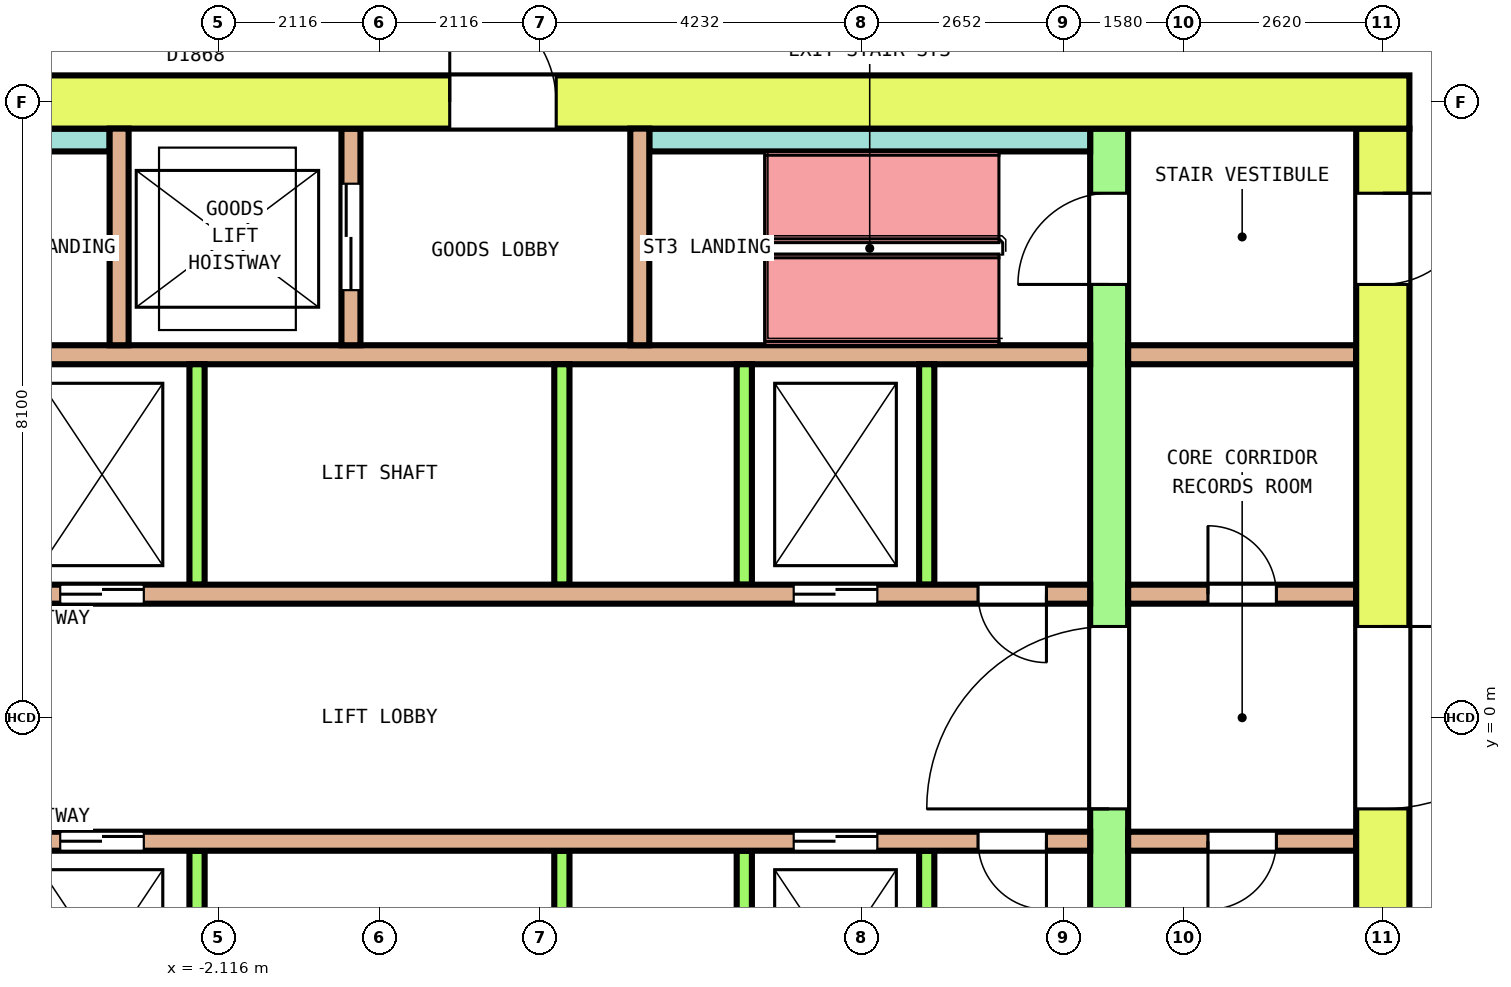
"""IFC4 building model, lengths in metres.
Left out: names, types, materials, properties, quantities, classifications, styles, units other than length and angle.
Written with IfcOpenShell. Run it as: python <this file> out.ifc"""

import sys

from ifc_helpers import new_model, si_unit, direction, frame, frame_2d, origin, place, context, subcontext, project, spatial, rectangle, extrude, element, fill, save


model = new_model("IFC4")
c1 = context("Model", 3, precision=1e-05, world=origin(), true_north=direction((0.0, 1.0)))
c2 = subcontext(c1, "Body", "Model", "MODEL_VIEW")
j1 = project(units=[si_unit("LENGTHUNIT", "METRE"), si_unit("PLANEANGLEUNIT", "RADIAN")], contexts=[c1])
p1 = place(None, origin())
s1 = spatial("IfcSite", under=j1, at=p1, CompositionType="ELEMENT")
p2 = place(p1, origin())
s2 = spatial("IfcBuilding", under=s1, at=p2, CompositionType="ELEMENT")
p3 = place(p2, frame((0.0, 0.0, 184.8)))
s3 = spatial("IfcBuildingStorey", under=s2, at=p3, CompositionType="ELEMENT", Elevation=184.8)
p4 = place(p3, frame((-13.55, 8.1, 0.0), z_axis=(0.0, 0.0, 1.0), x_axis=(1.0, 0.0, 0.0)))
e1 = element("IfcWall", 1, at=p4, inside=s3, PredefinedType="SHEAR", context=c2, shape_type="SweptSolid", body=[
    extrude(rectangle(XDim=27.1, YDim=0.7, at=frame_2d((13.55, 0.0))), origin(), (0.0, 0.0, 1.0), 4.1),
])
p5 = place(p4, frame((14.475, 0.0, 0.0)))
e2 = element("IfcOpeningElement", 2, at=p5, cuts=e1, PredefinedType="OPENING", context=c2, shape_type="SweptSolid", body=[
    extrude(rectangle(XDim=1.4, YDim=2.1, at=frame_2d((0.7, 1.05))), frame((0.0, 0.36, 0.0), z_axis=(0.0, -1.0, 0.0), x_axis=(1.0, 0.0, 0.0)), (0.0, 0.0, 1.0), 0.72),
])
p6 = place(p3, frame((13.2, -7.75, 0.0), z_axis=(0.0, 0.0, 1.0), x_axis=(0.0, 1.0, 0.0)))
e3 = element("IfcWall", 3, at=p6, inside=s3, PredefinedType="SHEAR", context=c2, shape_type="SweptSolid", body=[
    extrude(rectangle(XDim=15.5, YDim=0.7, at=frame_2d((7.75, 0.0))), origin(), (0.0, 0.0, 1.0), 4.1),
])
p7 = place(p6, frame((6.55, 0.0, 0.0)))
e4 = element("IfcOpeningElement", 4, at=p7, cuts=e3, PredefinedType="OPENING", context=c2, shape_type="SweptSolid", body=[
    extrude(rectangle(XDim=2.4, YDim=2.1, at=frame_2d((1.2, 1.05))), frame((0.0, 0.36, 0.0), z_axis=(0.0, -1.0, 0.0), x_axis=(1.0, 0.0, 0.0)), (0.0, 0.0, 1.0), 0.72),
])
p8 = place(p6, frame((13.45, 0.0, 0.0)))
e5 = element("IfcOpeningElement", 5, at=p8, cuts=e3, PredefinedType="OPENING", context=c2, shape_type="SweptSolid", body=[
    extrude(rectangle(XDim=1.2, YDim=2.1, at=frame_2d((0.6, 1.05))), frame((0.0, 0.36, 0.0), z_axis=(0.0, -1.0, 0.0), x_axis=(1.0, 0.0, 0.0)), (0.0, 0.0, 1.0), 0.72),
])
p9 = place(p6, frame((0.181, 0.0, 0.0)))
e6 = element("IfcOpeningElement", 6, at=p9, cuts=e3, PredefinedType="OPENING", context=c2, shape_type="SweptSolid", body=[
    extrude(rectangle(XDim=1.0, YDim=2.1, at=frame_2d((0.5, 1.05))), frame((0.0, 0.36, 0.0), z_axis=(0.0, -1.0, 0.0), x_axis=(1.0, 0.0, 0.0)), (0.0, 0.0, 1.0), 0.72),
])
p10 = place(p6, frame((1.669, 0.0, 0.0)))
e7 = element("IfcOpeningElement", 7, at=p10, cuts=e3, PredefinedType="OPENING", context=c2, shape_type="SweptSolid", body=[
    extrude(rectangle(XDim=1.0, YDim=2.1, at=frame_2d((0.5, 1.05))), frame((0.0, 0.36, 0.0), z_axis=(0.0, -1.0, 0.0), x_axis=(1.0, 0.0, 0.0)), (0.0, 0.0, 1.0), 0.72),
])
p11 = place(p3, frame((9.6, -7.75, 0.0), z_axis=(0.0, 0.0, 1.0), x_axis=(0.0, 1.0, 0.0)))
e8 = element("IfcWall", 8, at=p11, inside=s3, PredefinedType="SHEAR", context=c2, shape_type="SweptSolid", body=[
    extrude(rectangle(XDim=15.5, YDim=0.5, at=frame_2d((7.75, 0.0))), origin(), (0.0, 0.0, 1.0), 4.1),
])
p12 = place(p11, frame((6.55, 0.0, 0.0)))
e9 = element("IfcOpeningElement", 9, at=p12, cuts=e8, PredefinedType="OPENING", context=c2, shape_type="SweptSolid", body=[
    extrude(rectangle(XDim=2.4, YDim=2.1, at=frame_2d((1.2, 1.05))), frame((0.0, 0.26, 0.0), z_axis=(0.0, -1.0, 0.0), x_axis=(1.0, 0.0, 0.0)), (0.0, 0.0, 1.0), 0.52),
])
p13 = place(p11, frame((13.45, 0.0, 0.0)))
e10 = element("IfcOpeningElement", 10, at=p13, cuts=e8, PredefinedType="OPENING", context=c2, shape_type="SweptSolid", body=[
    extrude(rectangle(XDim=1.2, YDim=2.1, at=frame_2d((0.6, 1.05))), frame((0.0, 0.26, 0.0), z_axis=(0.0, -1.0, 0.0), x_axis=(1.0, 0.0, 0.0)), (0.0, 0.0, 1.0), 0.52),
])
p14 = place(p11, frame((0.95, 0.0, 0.0)))
e11 = element("IfcOpeningElement", 11, at=p14, cuts=e8, PredefinedType="OPENING", context=c2, shape_type="SweptSolid", body=[
    extrude(rectangle(XDim=1.0, YDim=2.1, at=frame_2d((0.5, 1.05))), frame((0.0, 0.26, 0.0), z_axis=(0.0, -1.0, 0.0), x_axis=(1.0, 0.0, 0.0)), (0.0, 0.0, 1.0), 0.52),
])
p15 = place(p3, frame((-9.35, 1.625, 0.0), z_axis=(0.0, 0.0, 1.0), x_axis=(1.0, 0.0, 0.0)))
e12 = element("IfcWall", 12, at=p15, inside=s3, PredefinedType="SOLIDWALL", context=c2, shape_type="SweptSolid", body=[
    extrude(rectangle(XDim=18.7, YDim=0.25, at=frame_2d((9.35, 0.0))), origin(), (0.0, 0.0, 1.0), 4.1),
])
p16 = place(p15, frame((2.85, 0.0, 0.0)))
e13 = element("IfcOpeningElement", 13, at=p16, cuts=e12, PredefinedType="OPENING", context=c2, shape_type="SweptSolid", body=[
    extrude(rectangle(XDim=1.1, YDim=2.1, at=frame_2d((0.55, 1.05))), frame((0.0, 0.135, 0.0), z_axis=(0.0, -1.0, 0.0), x_axis=(1.0, 0.0, 0.0)), (0.0, 0.0, 1.0), 0.27),
])
p17 = place(p15, frame((5.15, 0.0, 0.0)))
e14 = element("IfcOpeningElement", 14, at=p17, cuts=e12, PredefinedType="OPENING", context=c2, shape_type="SweptSolid", body=[
    extrude(rectangle(XDim=1.1, YDim=2.1, at=frame_2d((0.55, 1.05))), frame((0.0, 0.135, 0.0), z_axis=(0.0, -1.0, 0.0), x_axis=(1.0, 0.0, 0.0)), (0.0, 0.0, 1.0), 0.27),
])
p18 = place(p15, frame((14.8, 0.0, 0.0)))
e15 = element("IfcOpeningElement", 15, at=p18, cuts=e12, PredefinedType="OPENING", context=c2, shape_type="SweptSolid", body=[
    extrude(rectangle(XDim=1.1, YDim=2.1, at=frame_2d((0.55, 1.05))), frame((0.0, 0.135, 0.0), z_axis=(0.0, -1.0, 0.0), x_axis=(1.0, 0.0, 0.0)), (0.0, 0.0, 1.0), 0.27),
])
p19 = place(p15, frame((0.575, 0.0, 0.0)))
e16 = element("IfcOpeningElement", 16, at=p19, cuts=e12, PredefinedType="OPENING", context=c2, shape_type="SweptSolid", body=[
    extrude(rectangle(XDim=0.9, YDim=2.1, at=frame_2d((0.45, 1.05))), frame((0.0, 0.135, 0.0), z_axis=(0.0, -1.0, 0.0), x_axis=(1.0, 0.0, 0.0)), (0.0, 0.0, 1.0), 0.27),
])
p20 = place(p15, frame((17.225, 0.0, 0.0)))
e17 = element("IfcOpeningElement", 17, at=p20, cuts=e12, PredefinedType="OPENING", context=c2, shape_type="SweptSolid", body=[
    extrude(rectangle(XDim=0.9, YDim=2.1, at=frame_2d((0.45, 1.05))), frame((0.0, 0.135, 0.0), z_axis=(0.0, -1.0, 0.0), x_axis=(1.0, 0.0, 0.0)), (0.0, 0.0, 1.0), 0.27),
])
p21 = place(p3, frame((9.85, 1.625, 0.0), z_axis=(0.0, 0.0, 1.0), x_axis=(1.0, 0.0, 0.0)))
e18 = element("IfcWall", 18, at=p21, inside=s3, PredefinedType="SOLIDWALL", context=c2, shape_type="SweptSolid", body=[
    extrude(rectangle(XDim=3.0, YDim=0.25, at=frame_2d((1.5, 0.0))), origin(), (0.0, 0.0, 1.0), 4.1),
])
p22 = place(p21, frame((1.05, 0.0, 0.0)))
e19 = element("IfcOpeningElement", 19, at=p22, cuts=e18, PredefinedType="OPENING", context=c2, shape_type="SweptSolid", body=[
    extrude(rectangle(XDim=0.9, YDim=2.1, at=frame_2d((0.45, 1.05))), frame((0.0, 0.135, 0.0), z_axis=(0.0, -1.0, 0.0), x_axis=(1.0, 0.0, 0.0)), (0.0, 0.0, 1.0), 0.27),
])
p23 = place(p3, frame((-9.35, 4.775, 0.0), z_axis=(0.0, 0.0, 1.0), x_axis=(1.0, 0.0, 0.0)))
e20 = element("IfcWall", 20, at=p23, inside=s3, PredefinedType="SOLIDWALL", context=c2, shape_type="SweptSolid", body=[
    extrude(rectangle(XDim=18.7, YDim=0.25, at=frame_2d((9.35, 0.0))), origin(), (0.0, 0.0, 1.0), 4.1),
])
p24 = place(p3, frame((9.85, 4.775, 0.0), z_axis=(0.0, 0.0, 1.0), x_axis=(1.0, 0.0, 0.0)))
e21 = element("IfcWall", 21, at=p24, inside=s3, PredefinedType="SOLIDWALL", context=c2, shape_type="SweptSolid", body=[
    extrude(rectangle(XDim=3.0, YDim=0.25, at=frame_2d((1.5, 0.0))), origin(), (0.0, 0.0, 1.0), 4.1),
])
for number, where, z_axis, x_axis in (
    (22, (-2.4, 1.75, 0.0), (0.0, 0.0, 1.0), (0.0, 1.0, 0.0)),
    (23, (2.4, 1.75, 0.0), (0.0, 0.0, 1.0), (0.0, 1.0, 0.0)),
    (24, (4.8, 1.75, 0.0), (0.0, 0.0, 1.0), (0.0, 1.0, 0.0)),
    (25, (7.2, 1.75, 0.0), (0.0, 0.0, 1.0), (0.0, 1.0, 0.0)),
):
    element("IfcWall", number, at=place(p3, frame(where, z_axis=z_axis, x_axis=x_axis)), inside=s3, PredefinedType="SOLIDWALL", context=c2, shape_type="SweptSolid", body=[
        extrude(rectangle(XDim=2.9, YDim=0.2, at=frame_2d((1.45, 0.0))), origin(), (0.0, 0.0, 1.0), 4.1),
    ])
p25 = place(p3, frame((-9.35, -1.625, 0.0), z_axis=(0.0, 0.0, 1.0), x_axis=(1.0, 0.0, 0.0)))
e26 = element("IfcWall", 26, at=p25, inside=s3, PredefinedType="SOLIDWALL", context=c2, shape_type="SweptSolid", body=[
    extrude(rectangle(XDim=18.7, YDim=0.25, at=frame_2d((9.35, 0.0))), origin(), (0.0, 0.0, 1.0), 4.1),
])
p26 = place(p25, frame((2.85, 0.0, 0.0)))
e27 = element("IfcOpeningElement", 27, at=p26, cuts=e26, PredefinedType="OPENING", context=c2, shape_type="SweptSolid", body=[
    extrude(rectangle(XDim=1.1, YDim=2.1, at=frame_2d((0.55, 1.05))), frame((0.0, 0.135, 0.0), z_axis=(0.0, -1.0, 0.0), x_axis=(1.0, 0.0, 0.0)), (0.0, 0.0, 1.0), 0.27),
])
p27 = place(p25, frame((5.15, 0.0, 0.0)))
e28 = element("IfcOpeningElement", 28, at=p27, cuts=e26, PredefinedType="OPENING", context=c2, shape_type="SweptSolid", body=[
    extrude(rectangle(XDim=1.1, YDim=2.1, at=frame_2d((0.55, 1.05))), frame((0.0, 0.135, 0.0), z_axis=(0.0, -1.0, 0.0), x_axis=(1.0, 0.0, 0.0)), (0.0, 0.0, 1.0), 0.27),
])
p28 = place(p25, frame((14.8, 0.0, 0.0)))
e29 = element("IfcOpeningElement", 29, at=p28, cuts=e26, PredefinedType="OPENING", context=c2, shape_type="SweptSolid", body=[
    extrude(rectangle(XDim=1.1, YDim=2.1, at=frame_2d((0.55, 1.05))), frame((0.0, 0.135, 0.0), z_axis=(0.0, -1.0, 0.0), x_axis=(1.0, 0.0, 0.0)), (0.0, 0.0, 1.0), 0.27),
])
p29 = place(p25, frame((0.575, 0.0, 0.0)))
e30 = element("IfcOpeningElement", 30, at=p29, cuts=e26, PredefinedType="OPENING", context=c2, shape_type="SweptSolid", body=[
    extrude(rectangle(XDim=0.9, YDim=2.1, at=frame_2d((0.45, 1.05))), frame((0.0, 0.135, 0.0), z_axis=(0.0, -1.0, 0.0), x_axis=(1.0, 0.0, 0.0)), (0.0, 0.0, 1.0), 0.27),
])
p30 = place(p25, frame((17.225, 0.0, 0.0)))
e31 = element("IfcOpeningElement", 31, at=p30, cuts=e26, PredefinedType="OPENING", context=c2, shape_type="SweptSolid", body=[
    extrude(rectangle(XDim=0.9, YDim=2.1, at=frame_2d((0.45, 1.05))), frame((0.0, 0.135, 0.0), z_axis=(0.0, -1.0, 0.0), x_axis=(1.0, 0.0, 0.0)), (0.0, 0.0, 1.0), 0.27),
])
p31 = place(p3, frame((9.85, -1.625, 0.0), z_axis=(0.0, 0.0, 1.0), x_axis=(1.0, 0.0, 0.0)))
e32 = element("IfcWall", 32, at=p31, inside=s3, PredefinedType="SOLIDWALL", context=c2, shape_type="SweptSolid", body=[
    extrude(rectangle(XDim=3.0, YDim=0.25, at=frame_2d((1.5, 0.0))), origin(), (0.0, 0.0, 1.0), 4.1),
])
p32 = place(p31, frame((1.05, 0.0, 0.0)))
e33 = element("IfcOpeningElement", 33, at=p32, cuts=e32, PredefinedType="OPENING", context=c2, shape_type="SweptSolid", body=[
    extrude(rectangle(XDim=0.9, YDim=2.1, at=frame_2d((0.45, 1.05))), frame((0.0, 0.135, 0.0), z_axis=(0.0, -1.0, 0.0), x_axis=(1.0, 0.0, 0.0)), (0.0, 0.0, 1.0), 0.27),
])
for number, where, z_axis, x_axis in (
    (34, (-2.4, -4.65, 0.0), (0.0, 0.0, 1.0), (0.0, 1.0, 0.0)),
    (35, (2.4, -4.65, 0.0), (0.0, 0.0, 1.0), (0.0, 1.0, 0.0)),
    (36, (4.8, -4.65, 0.0), (0.0, 0.0, 1.0), (0.0, 1.0, 0.0)),
    (37, (7.2, -4.65, 0.0), (0.0, 0.0, 1.0), (0.0, 1.0, 0.0)),
):
    element("IfcWall", number, at=place(p3, frame(where, z_axis=z_axis, x_axis=x_axis)), inside=s3, PredefinedType="SOLIDWALL", context=c2, shape_type="SweptSolid", body=[
        extrude(rectangle(XDim=2.9, YDim=0.2, at=frame_2d((1.45, 0.0))), origin(), (0.0, 0.0, 1.0), 4.1),
    ])
for number, where, z_axis, x_axis in (
    (38, (-9.35, 7.6, 0.0), (0.0, 0.0, 1.0), (1.0, 0.0, 0.0)),
    (39, (3.55, 7.6, 0.0), (0.0, 0.0, 1.0), (1.0, 0.0, 0.0)),
):
    element("IfcWall", number, at=place(p3, frame(where, z_axis=z_axis, x_axis=x_axis)), inside=s3, PredefinedType="SOLIDWALL", context=c2, shape_type="SweptSolid", body=[
        extrude(rectangle(XDim=5.8, YDim=0.3, at=frame_2d((2.9, 0.0))), origin(), (0.0, 0.0, 1.0), 4.1),
    ])
p33 = place(p3, frame((-3.425, 4.9, 0.0), z_axis=(0.0, 0.0, 1.0), x_axis=(0.0, 1.0, 0.0)))
e40 = element("IfcWall", 40, at=p33, inside=s3, PredefinedType="SOLIDWALL", context=c2, shape_type="SweptSolid", body=[
    extrude(rectangle(XDim=2.85, YDim=0.25, at=frame_2d((1.425, 0.0))), origin(), (0.0, 0.0, 1.0), 4.1),
])
p34 = place(p3, frame((-0.375, 4.9, 0.0), z_axis=(0.0, 0.0, 1.0), x_axis=(0.0, 1.0, 0.0)))
e41 = element("IfcWall", 41, at=p34, inside=s3, PredefinedType="SOLIDWALL", context=c2, shape_type="SweptSolid", body=[
    extrude(rectangle(XDim=2.85, YDim=0.25, at=frame_2d((1.425, 0.0))), origin(), (0.0, 0.0, 1.0), 4.1),
])
p35 = place(p34, frame((0.725, 0.0, 0.0)))
e42 = element("IfcOpeningElement", 42, at=p35, cuts=e41, PredefinedType="OPENING", context=c2, shape_type="SweptSolid", body=[
    extrude(rectangle(XDim=1.4, YDim=2.1, at=frame_2d((0.7, 1.05))), frame((0.0, 0.135, 0.0), z_axis=(0.0, -1.0, 0.0), x_axis=(1.0, 0.0, 0.0)), (0.0, 0.0, 1.0), 0.27),
])
p36 = place(p3, frame((3.425, 4.9, 0.0), z_axis=(0.0, 0.0, 1.0), x_axis=(0.0, 1.0, 0.0)))
e43 = element("IfcWall", 43, at=p36, inside=s3, PredefinedType="SOLIDWALL", context=c2, shape_type="SweptSolid", body=[
    extrude(rectangle(XDim=2.85, YDim=0.25, at=frame_2d((1.425, 0.0))), origin(), (0.0, 0.0, 1.0), 4.1),
])
p37 = place(p17, origin())
e44 = element("IfcDoor", 44, at=p37, inside=s3, OperationType="DOUBLE_DOOR_SLIDING", PredefinedType="DOOR", context=c2, shape_type="SweptSolid", body=[
    extrude(rectangle(XDim=1.1, YDim=2.1, at=frame_2d((0.55, 1.05))), frame((0.0, 0.075, 0.0), z_axis=(0.0, -1.0, 0.0), x_axis=(1.0, 0.0, 0.0)), (0.0, 0.0, 1.0), 0.15),
])
fill(e14, e44)
p38 = place(p18, origin())
e45 = element("IfcDoor", 45, at=p38, inside=s3, OperationType="DOUBLE_DOOR_SLIDING", PredefinedType="DOOR", context=c2, shape_type="SweptSolid", body=[
    extrude(rectangle(XDim=1.1, YDim=2.1, at=frame_2d((0.55, 1.05))), frame((0.0, 0.075, 0.0), z_axis=(0.0, -1.0, 0.0), x_axis=(1.0, 0.0, 0.0)), (0.0, 0.0, 1.0), 0.15),
])
fill(e15, e45)
p39 = place(p27, origin())
e46 = element("IfcDoor", 46, at=p39, inside=s3, OperationType="DOUBLE_DOOR_SLIDING", PredefinedType="DOOR", context=c2, shape_type="SweptSolid", body=[
    extrude(rectangle(XDim=1.1, YDim=2.1, at=frame_2d((0.55, 1.05))), frame((0.0, 0.075, 0.0), z_axis=(0.0, -1.0, 0.0), x_axis=(1.0, 0.0, 0.0)), (0.0, 0.0, 1.0), 0.15),
])
fill(e28, e46)
p40 = place(p28, origin())
e47 = element("IfcDoor", 47, at=p40, inside=s3, OperationType="DOUBLE_DOOR_SLIDING", PredefinedType="DOOR", context=c2, shape_type="SweptSolid", body=[
    extrude(rectangle(XDim=1.1, YDim=2.1, at=frame_2d((0.55, 1.05))), frame((0.0, 0.075, 0.0), z_axis=(0.0, -1.0, 0.0), x_axis=(1.0, 0.0, 0.0)), (0.0, 0.0, 1.0), 0.15),
])
fill(e29, e47)
p41 = place(p35, origin())
e48 = element("IfcDoor", 48, at=p41, inside=s3, OperationType="DOUBLE_DOOR_SLIDING", PredefinedType="DOOR", context=c2, shape_type="SweptSolid", body=[
    extrude(rectangle(XDim=1.4, YDim=2.1, at=frame_2d((0.7, 1.05))), frame((0.0, 0.075, 0.0), z_axis=(0.0, -1.0, 0.0), x_axis=(1.0, 0.0, 0.0)), (0.0, 0.0, 1.0), 0.15),
])
fill(e42, e48)
p42 = place(p12, origin())
e49 = element("IfcDoor", 49, at=p42, inside=s3, OperationType="DOUBLE_DOOR_SINGLE_SWING", PredefinedType="DOOR", context=c2, shape_type="SweptSolid", body=[
    extrude(rectangle(XDim=2.4, YDim=2.1, at=frame_2d((1.2, 1.05))), frame((0.0, 0.2, 0.0), z_axis=(0.0, -1.0, 0.0), x_axis=(1.0, 0.0, 0.0)), (0.0, 0.0, 1.0), 0.4),
])
fill(e9, e49)
p43 = place(p7, origin())
e50 = element("IfcDoor", 50, at=p43, inside=s3, OperationType="DOUBLE_DOOR_SINGLE_SWING", PredefinedType="DOOR", context=c2, shape_type="SweptSolid", body=[
    extrude(rectangle(XDim=2.4, YDim=2.1, at=frame_2d((1.2, 1.05))), frame((0.0, 0.3, 0.0), z_axis=(0.0, -1.0, 0.0), x_axis=(1.0, 0.0, 0.0)), (0.0, 0.0, 1.0), 0.6),
])
fill(e4, e50)
p44 = place(p13, origin())
e51 = element("IfcDoor", 51, at=p44, inside=s3, OperationType="SINGLE_SWING_LEFT", PredefinedType="DOOR", context=c2, shape_type="SweptSolid", body=[
    extrude(rectangle(XDim=1.2, YDim=2.1, at=frame_2d((0.6, 1.05))), frame((0.0, 0.2, 0.0), z_axis=(0.0, -1.0, 0.0), x_axis=(1.0, 0.0, 0.0)), (0.0, 0.0, 1.0), 0.4),
])
fill(e10, e51)
p45 = place(p8, origin())
e52 = element("IfcDoor", 52, at=p45, inside=s3, OperationType="SINGLE_SWING_RIGHT", PredefinedType="DOOR", context=c2, shape_type="SweptSolid", body=[
    extrude(rectangle(XDim=1.2, YDim=2.1, at=frame_2d((0.6, 1.05))), frame((0.0, 0.3, 0.0), z_axis=(0.0, -1.0, 0.0), x_axis=(1.0, 0.0, 0.0)), (0.0, 0.0, 1.0), 0.6),
])
fill(e5, e52)
p46 = place(p5, origin())
e53 = element("IfcDoor", 53, at=p46, inside=s3, OperationType="DOUBLE_DOOR_SINGLE_SWING", PredefinedType="DOOR", context=c2, shape_type="SweptSolid", body=[
    extrude(rectangle(XDim=1.4, YDim=2.1, at=frame_2d((0.7, 1.05))), frame((0.0, 0.3, 0.0), z_axis=(0.0, -1.0, 0.0), x_axis=(1.0, 0.0, 0.0)), (0.0, 0.0, 1.0), 0.6),
])
fill(e2, e53)
p47 = place(p20, origin())
e54 = element("IfcDoor", 54, at=p47, inside=s3, OperationType="SINGLE_SWING_LEFT", PredefinedType="DOOR", context=c2, shape_type="SweptSolid", body=[
    extrude(rectangle(XDim=0.9, YDim=2.1, at=frame_2d((0.45, 1.05))), frame((0.0, 0.075, 0.0), z_axis=(0.0, -1.0, 0.0), x_axis=(1.0, 0.0, 0.0)), (0.0, 0.0, 1.0), 0.15),
])
fill(e17, e54)
p48 = place(p22, origin())
e55 = element("IfcDoor", 55, at=p48, inside=s3, OperationType="SINGLE_SWING_RIGHT", PredefinedType="DOOR", context=c2, shape_type="SweptSolid", body=[
    extrude(rectangle(XDim=0.9, YDim=2.1, at=frame_2d((0.45, 1.05))), frame((0.0, 0.075, 0.0), z_axis=(0.0, -1.0, 0.0), x_axis=(1.0, 0.0, 0.0)), (0.0, 0.0, 1.0), 0.15),
])
fill(e19, e55)
p49 = place(p30, origin())
e56 = element("IfcDoor", 56, at=p49, inside=s3, OperationType="SINGLE_SWING_RIGHT", PredefinedType="DOOR", context=c2, shape_type="SweptSolid", body=[
    extrude(rectangle(XDim=0.9, YDim=2.1, at=frame_2d((0.45, 1.05))), frame((0.0, 0.075, 0.0), z_axis=(0.0, -1.0, 0.0), x_axis=(1.0, 0.0, 0.0)), (0.0, 0.0, 1.0), 0.15),
])
fill(e31, e56)
p50 = place(p32, origin())
e57 = element("IfcDoor", 57, at=p50, inside=s3, OperationType="SINGLE_SWING_LEFT", PredefinedType="DOOR", context=c2, shape_type="SweptSolid", body=[
    extrude(rectangle(XDim=0.9, YDim=2.1, at=frame_2d((0.45, 1.05))), frame((0.0, 0.075, 0.0), z_axis=(0.0, -1.0, 0.0), x_axis=(1.0, 0.0, 0.0)), (0.0, 0.0, 1.0), 0.15),
])
fill(e33, e57)
save(model, sys.argv[1])
